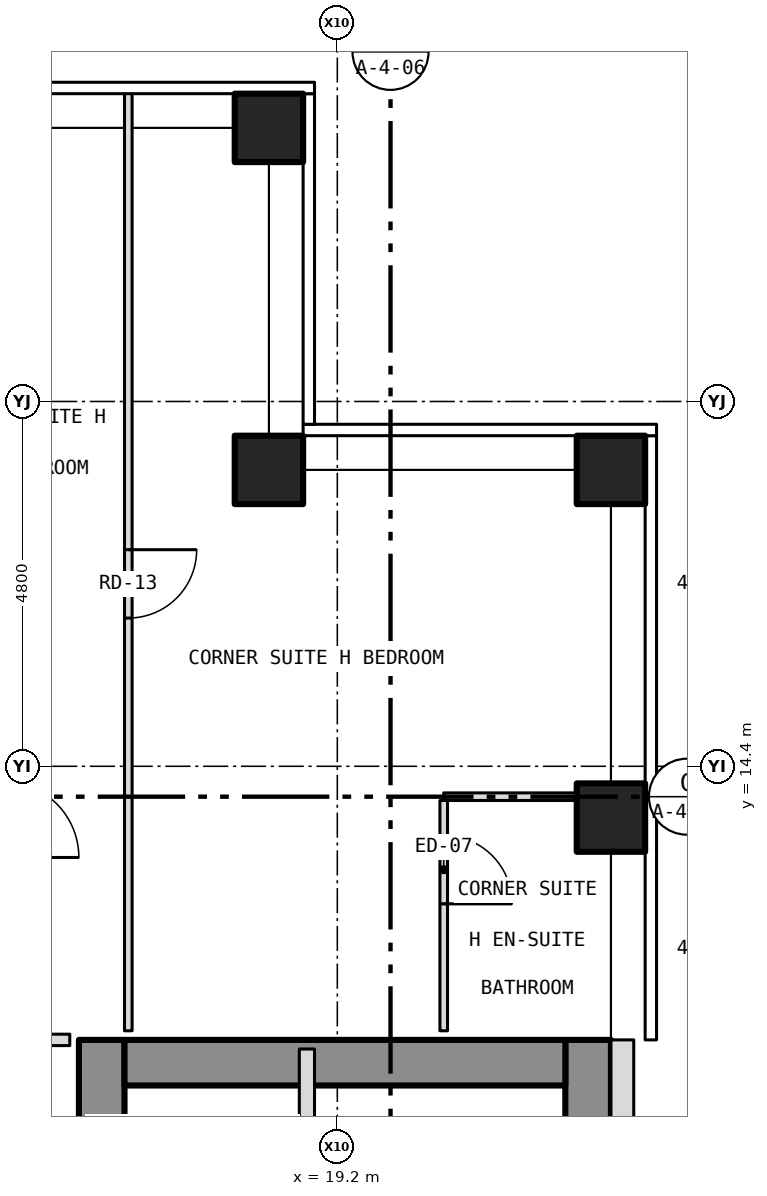
"""IFC4 building model, lengths in metres.
Left out: names, types, materials, properties, quantities, classifications, styles, units other than length and angle.
Written with IfcOpenShell. Run it as: python <this file> out.ifc"""

import sys

from ifc_helpers import new_model, si_unit, direction, frame, frame_2d, origin, origin_2d, place, context, subcontext, project, spatial, rectangle, hollow_rectangle, extrude, element, fill, save


model = new_model("IFC4")
c1 = context("Model", 3, precision=1e-05, world=origin(), true_north=direction((0.0, 1.0)))
c2 = subcontext(c1, "Body", "Model", "MODEL_VIEW")
j1 = project(units=[si_unit("LENGTHUNIT", "METRE"), si_unit("PLANEANGLEUNIT", "RADIAN")], contexts=[c1])
p1 = place(None, origin())
s1 = spatial("IfcSite", under=j1, at=p1, CompositionType="ELEMENT")
p2 = place(p1, origin())
s2 = spatial("IfcBuilding", under=s1, at=p2, CompositionType="ELEMENT")
p3 = place(p2, frame((0.0, 0.0, 131.0)))
s3 = spatial("IfcBuildingStorey", under=s2, at=p3, CompositionType="ELEMENT", Elevation=131.0)
for number, where, z_axis, x_axis in (
    (1, (18.3, 22.8, -0.15), (0.0, 0.0, 1.0), (1.0, 0.0, 0.0)),
    (2, (22.8, 13.725, -0.15), (0.0, 0.0, 1.0), (1.0, 0.0, 0.0)),
    (3, (22.8, 18.3, -0.15), (0.0, 0.0, 1.0), (1.0, 0.0, 0.0)),
    (4, (18.3, 18.3, -0.15), (0.0, 0.0, 1.0), (1.0, 0.0, 0.0)),
):
    element("IfcColumn", number, at=place(p3, frame(where, z_axis=z_axis, x_axis=x_axis)), inside=s3, PredefinedType="COLUMN", context=c2, shape_type="SweptSolid", body=[
        extrude(hollow_rectangle(XDim=0.9, YDim=0.9, WallThickness=0.05, at=origin_2d()), origin(), (0.0, 0.0, 1.0), 3.5),
    ])
p4 = place(p3, frame((16.1, -10.8, 0.0), z_axis=(0.0, 0.0, 1.0), x_axis=(0.0, 1.0, 0.0)))
e5 = element("IfcWall", 5, at=p4, inside=s3, PredefinedType="SHEAR", context=c2, shape_type="SweptSolid", body=[
    extrude(rectangle(XDim=21.6, YDim=0.6, at=frame_2d((10.8, 0.0))), origin(), (0.0, 0.0, 1.0), 3.25),
])
p5 = place(p4, frame((9.4, 0.0, 0.0)))
e6 = element("IfcOpeningElement", 6, at=p5, cuts=e5, PredefinedType="OPENING", context=c2, shape_type="SweptSolid", body=[
    extrude(rectangle(XDim=1.1, YDim=2.1, at=frame_2d((0.55, 1.05))), frame((0.0, 0.312, 0.0), z_axis=(0.0, -1.0, 0.0), x_axis=(1.0, 0.0, 0.0)), (0.0, 0.0, 1.0), 0.624),
])
p6 = place(p4, frame((11.5, 0.0, 0.0)))
e7 = element("IfcOpeningElement", 7, at=p6, cuts=e5, PredefinedType="OPENING", context=c2, shape_type="SweptSolid", body=[
    extrude(rectangle(XDim=1.1, YDim=2.1, at=frame_2d((0.55, 1.05))), frame((0.0, 0.312, 0.0), z_axis=(0.0, -1.0, 0.0), x_axis=(1.0, 0.0, 0.0)), (0.0, 0.0, 1.0), 0.624),
])
p7 = place(p4, frame((13.6, 0.0, 0.0)))
e8 = element("IfcOpeningElement", 8, at=p7, cuts=e5, PredefinedType="OPENING", context=c2, shape_type="SweptSolid", body=[
    extrude(rectangle(XDim=1.1, YDim=2.1, at=frame_2d((0.55, 1.05))), frame((0.0, 0.312, 0.0), z_axis=(0.0, -1.0, 0.0), x_axis=(1.0, 0.0, 0.0)), (0.0, 0.0, 1.0), 0.624),
])
p8 = place(p4, frame((15.7, 0.0, 0.0)))
e9 = element("IfcOpeningElement", 9, at=p8, cuts=e5, PredefinedType="OPENING", context=c2, shape_type="SweptSolid", body=[
    extrude(rectangle(XDim=1.1, YDim=2.1, at=frame_2d((0.55, 1.05))), frame((0.0, 0.312, 0.0), z_axis=(0.0, -1.0, 0.0), x_axis=(1.0, 0.0, 0.0)), (0.0, 0.0, 1.0), 0.624),
])
p9 = place(p4, frame((17.8, 0.0, 0.0)))
e10 = element("IfcOpeningElement", 10, at=p9, cuts=e5, PredefinedType="OPENING", context=c2, shape_type="SweptSolid", body=[
    extrude(rectangle(XDim=1.1, YDim=2.1, at=frame_2d((0.55, 1.05))), frame((0.0, 0.312, 0.0), z_axis=(0.0, -1.0, 0.0), x_axis=(1.0, 0.0, 0.0)), (0.0, 0.0, 1.0), 0.624),
])
p10 = place(p4, frame((5.642, 0.0, 0.0)))
e11 = element("IfcOpeningElement", 11, at=p10, cuts=e5, PredefinedType="OPENING", context=c2, shape_type="SweptSolid", body=[
    extrude(rectangle(XDim=1.1, YDim=2.1, at=frame_2d((0.55, 1.05))), frame((0.0, 0.312, 0.0), z_axis=(0.0, -1.0, 0.0), x_axis=(1.0, 0.0, 0.0)), (0.0, 0.0, 1.0), 0.624),
])
p11 = place(p4, frame((7.5, 0.0, 0.0)))
e12 = element("IfcOpeningElement", 12, at=p11, cuts=e5, PredefinedType="OPENING", context=c2, shape_type="SweptSolid", body=[
    extrude(rectangle(XDim=1.1, YDim=2.1, at=frame_2d((0.55, 1.05))), frame((0.0, 0.312, 0.0), z_axis=(0.0, -1.0, 0.0), x_axis=(1.0, 0.0, 0.0)), (0.0, 0.0, 1.0), 0.624),
])
p12 = place(p3, frame((22.5, -10.8, 0.0), z_axis=(0.0, 0.0, 1.0), x_axis=(0.0, 1.0, 0.0)))
e13 = element("IfcWall", 13, at=p12, inside=s3, PredefinedType="SHEAR", context=c2, shape_type="SweptSolid", body=[
    extrude(rectangle(XDim=21.6, YDim=0.6, at=frame_2d((10.8, 0.0))), origin(), (0.0, 0.0, 1.0), 3.25),
])
p13 = place(p3, frame((16.4, 10.5, 0.0), z_axis=(0.0, 0.0, 1.0), x_axis=(1.0, 0.0, 0.0)))
e14 = element("IfcWall", 14, at=p13, inside=s3, PredefinedType="SHEAR", context=c2, shape_type="SweptSolid", body=[
    extrude(rectangle(XDim=5.8, YDim=0.6, at=frame_2d((2.9, 0.0))), origin(), (0.0, 0.0, 1.0), 3.25),
])
p14 = place(p3, frame((22.95, -10.8, 0.0), z_axis=(0.0, 0.0, 1.0), x_axis=(0.0, 1.0, 0.0)))
e15 = element("IfcWall", 15, at=p14, inside=s3, PredefinedType="SOLIDWALL", context=c2, shape_type="SweptSolid", body=[
    extrude(rectangle(XDim=21.6, YDim=0.3, at=frame_2d((10.8, 0.0))), origin(), (0.0, 0.0, 1.0), 3.5),
])
p15 = place(p14, frame((2.95, 0.0, 1.0)))
e16 = element("IfcOpeningElement", 16, at=p15, cuts=e15, PredefinedType="OPENING", context=c2, shape_type="SweptSolid", body=[
    extrude(rectangle(XDim=0.6, YDim=1.5, at=frame_2d((0.3, 0.75))), frame((0.0, 0.162, 0.0), z_axis=(0.0, -1.0, 0.0), x_axis=(1.0, 0.0, 0.0)), (0.0, 0.0, 1.0), 0.324),
])
p16 = place(p3, frame((14.8, 10.8, 0.0), z_axis=(0.0, 0.0, 1.0), x_axis=(1.0, 0.0, 0.0)))
e17 = element("IfcWall", 17, at=p16, inside=s3, PredefinedType="PARTITIONING", context=c2, shape_type="SweptSolid", body=[
    extrude(rectangle(XDim=0.88, YDim=0.15, at=frame_2d((0.44, 0.0))), origin(), (0.0, 0.0, 1.0), 3.35),
])
p17 = place(p3, frame((20.6, 14.0, 0.0), z_axis=(0.0, 0.0, 1.0), x_axis=(1.0, 0.0, 0.0)))
e18 = element("IfcWall", 18, at=p17, inside=s3, PredefinedType="PARTITIONING", context=c2, shape_type="SweptSolid", body=[
    extrude(rectangle(XDim=2.08, YDim=0.1, at=frame_2d((1.04, 0.0))), origin(), (0.0, 0.0, 1.0), 3.35),
])
p18 = place(p3, frame((16.45, 10.92, 0.0), z_axis=(0.0, 0.0, 1.0), x_axis=(0.0, 1.0, 0.0)))
e19 = element("IfcWall", 19, at=p18, inside=s3, PredefinedType="PARTITIONING", context=c2, shape_type="SweptSolid", body=[
    extrude(rectangle(XDim=12.36, YDim=0.1, at=frame_2d((6.18, 0.0))), origin(), (0.0, 0.0, 1.0), 3.35),
])
p19 = place(p18, frame((5.43, 0.0, 0.0)))
e20 = element("IfcOpeningElement", 20, at=p19, cuts=e19, PredefinedType="OPENING", context=c2, shape_type="SweptSolid", body=[
    extrude(rectangle(XDim=0.9, YDim=2.1, at=frame_2d((0.45, 1.05))), frame((0.0, 0.062, 0.0), z_axis=(0.0, -1.0, 0.0), x_axis=(1.0, 0.0, 0.0)), (0.0, 0.0, 1.0), 0.124),
])
p20 = place(p3, frame((18.8, 4.45, 0.0), z_axis=(0.0, 0.0, 1.0), x_axis=(0.0, 1.0, 0.0)))
e21 = element("IfcWall", 21, at=p20, inside=s3, PredefinedType="PARTITIONING", context=c2, shape_type="SweptSolid", body=[
    extrude(rectangle(XDim=6.23, YDim=0.2, at=frame_2d((3.115, 0.0))), origin(), (0.0, 0.0, 1.0), 3.25),
])
p21 = place(p3, frame((20.6, 10.92, 0.0), z_axis=(0.0, 0.0, 1.0), x_axis=(0.0, 1.0, 0.0)))
e22 = element("IfcWall", 22, at=p21, inside=s3, PredefinedType="PARTITIONING", context=c2, shape_type="SweptSolid", body=[
    extrude(rectangle(XDim=3.03, YDim=0.1, at=frame_2d((1.515, 0.0))), origin(), (0.0, 0.0, 1.0), 3.35),
])
p22 = place(p21, frame((1.67, 0.0, 0.0)))
e23 = element("IfcOpeningElement", 23, at=p22, cuts=e22, PredefinedType="OPENING", context=c2, shape_type="SweptSolid", body=[
    extrude(rectangle(XDim=0.9, YDim=2.1, at=frame_2d((0.45, 1.05))), frame((0.0, 0.062, 0.0), z_axis=(0.0, -1.0, 0.0), x_axis=(1.0, 0.0, 0.0)), (0.0, 0.0, 1.0), 0.124),
])
p23 = place(p19, origin())
e24 = element("IfcDoor", 24, at=p23, inside=s3, OperationType="SINGLE_SWING_RIGHT", PredefinedType="DOOR", context=c2, shape_type="SweptSolid", body=[
    extrude(rectangle(XDim=0.9, YDim=2.1, at=frame_2d((0.45, 1.05))), frame((0.0, 0.025, 0.0), z_axis=(0.0, -1.0, 0.0), x_axis=(1.0, 0.0, 0.0)), (0.0, 0.0, 1.0), 0.05),
])
fill(e20, e24)
p24 = place(p22, origin())
e25 = element("IfcDoor", 25, at=p24, inside=s3, OperationType="SINGLE_SWING_LEFT", PredefinedType="DOOR", context=c2, shape_type="SweptSolid", body=[
    extrude(rectangle(XDim=0.9, YDim=2.1, at=frame_2d((0.45, 1.05))), frame((0.0, 0.025, 0.0), z_axis=(0.0, -1.0, 0.0), x_axis=(1.0, 0.0, 0.0)), (0.0, 0.0, 1.0), 0.05),
])
fill(e23, e25)
save(model, sys.argv[1])
